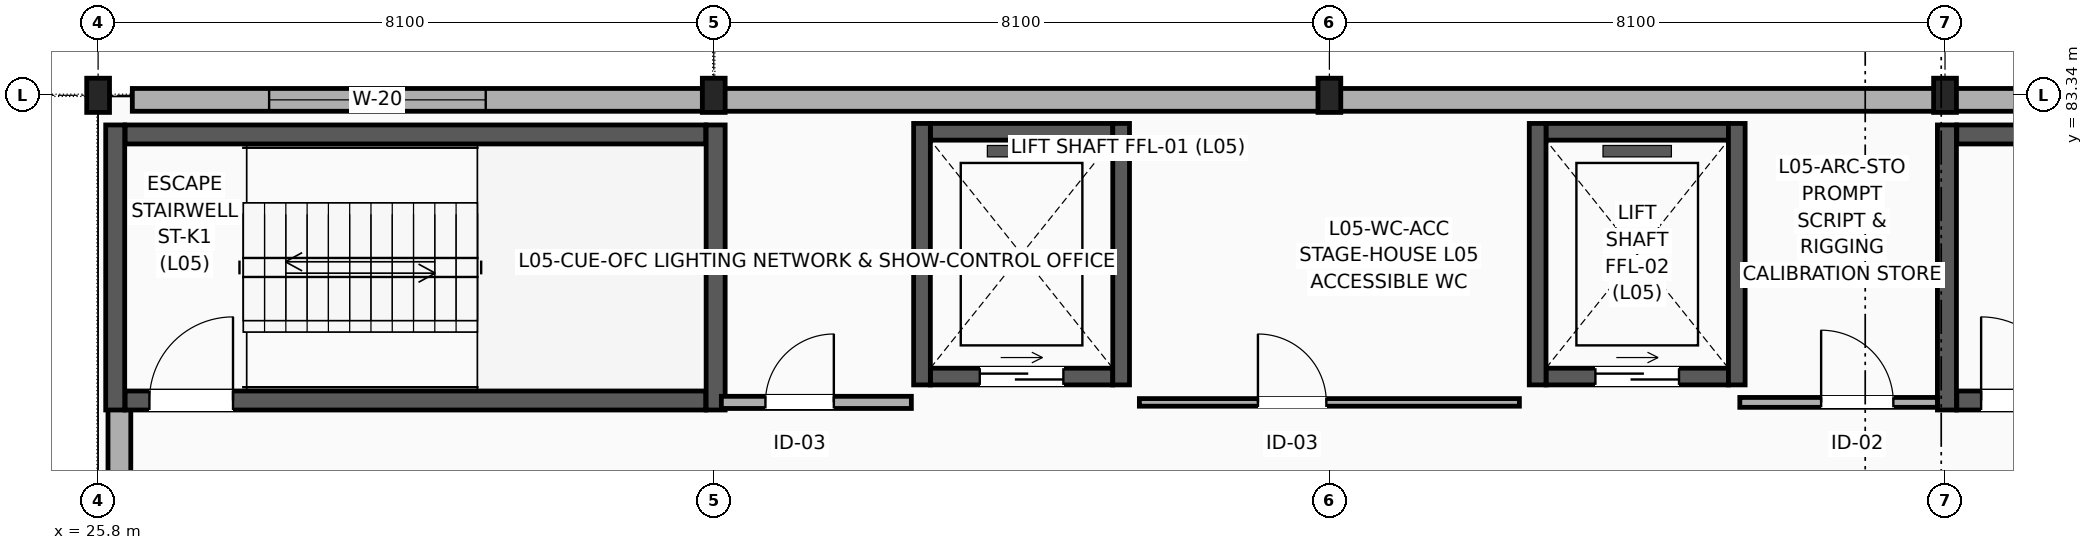
"""IFC4 building model, lengths in metres.
Left out: names, types, materials, properties, quantities, classifications, styles, units other than length and angle.
Written with IfcOpenShell. Run it as: python <this file> out.ifc"""

import sys

from ifc_helpers import new_model, si_unit, direction, frame, frame_2d, origin, origin_2d, place, context, subcontext, project, spatial, rectangle, i_section, extrude, element, fill, save


model = new_model("IFC4")
c1 = context("Model", 3, precision=1e-05, world=origin(), true_north=direction((0.0, 1.0)))
c2 = subcontext(c1, "Body", "Model", "MODEL_VIEW")
j1 = project(units=[si_unit("LENGTHUNIT", "METRE"), si_unit("PLANEANGLEUNIT", "RADIAN")], contexts=[c1])
p1 = place(None, origin())
s1 = spatial("IfcSite", under=j1, at=p1, CompositionType="ELEMENT")
p2 = place(p1, origin())
s2 = spatial("IfcBuilding", under=s1, at=p2, CompositionType="ELEMENT")
p3 = place(p2, frame((0.0, 0.0, 23.4)))
s3 = spatial("IfcBuildingStorey", under=s2, at=p3, CompositionType="ELEMENT", Elevation=23.4)
for number, where, z_axis, x_axis in (
    (1, (25.8, 83.34, 0.0), (0.0, 0.0, 1.0), (1.0, 0.0, 0.0)),
    (2, (33.9, 83.34, 0.0), (0.0, 0.0, 1.0), (1.0, 0.0, 0.0)),
    (3, (42.0, 83.34, 0.0), (0.0, 0.0, 1.0), (1.0, 0.0, 0.0)),
    (4, (50.1, 83.34, 0.0), (0.0, 0.0, 1.0), (1.0, 0.0, 0.0)),
):
    element("IfcColumn", number, at=place(p3, frame(where, z_axis=z_axis, x_axis=x_axis)), inside=s3, PredefinedType="COLUMN", context=c2, shape_type="SweptSolid", body=[
        extrude(i_section(OverallWidth=0.3, OverallDepth=0.45, WebThickness=0.014, FlangeThickness=0.026, FilletRadius=0.027, at=origin_2d()), origin(), (0.0, 0.0, 1.0), 4.2),
    ])
p4 = place(p3, frame((26.08, 61.35, 0.0), z_axis=(0.0, 0.0, 1.0), x_axis=(0.0, 1.0, 0.0)))
e5 = element("IfcWall", 5, at=p4, inside=s3, PredefinedType="SOLIDWALL", context=c2, shape_type="SweptSolid", body=[
    extrude(rectangle(XDim=17.95, YDim=0.3, at=frame_2d((8.975, 0.0))), origin(), (0.0, 0.0, 1.0), 3.36),
])
p5 = place(p3, frame((26.25, 83.28, 0.0), z_axis=(0.0, 0.0, 1.0), x_axis=(1.0, 0.0, 0.0)))
e6 = element("IfcWall", 6, at=p5, inside=s3, PredefinedType="SOLIDWALL", context=c2, shape_type="SweptSolid", body=[
    extrude(rectangle(XDim=31.5, YDim=0.3, at=frame_2d((15.75, 0.0))), origin(), (0.0, 0.0, 1.0), 3.36),
])
p6 = place(p5, frame((1.8, 0.0, 1.5)))
e7 = element("IfcOpeningElement", 7, at=p6, cuts=e6, PredefinedType="OPENING", context=c2, shape_type="SweptSolid", body=[
    extrude(rectangle(XDim=2.85, YDim=1.65, at=frame_2d((1.425, 0.825))), frame((0.0, 0.16, 0.0), z_axis=(0.0, -1.0, 0.0), x_axis=(1.0, 0.0, 0.0)), (0.0, 0.0, 1.0), 0.32),
])
p7 = place(p5, frame((25.6, 0.0, 1.5)))
e8 = element("IfcOpeningElement", 8, at=p7, cuts=e6, PredefinedType="OPENING", context=c2, shape_type="SweptSolid", body=[
    extrude(rectangle(XDim=2.85, YDim=1.65, at=frame_2d((1.425, 0.825))), frame((0.0, 0.16, 0.0), z_axis=(0.0, -1.0, 0.0), x_axis=(1.0, 0.0, 0.0)), (0.0, 0.0, 1.0), 0.32),
])
p8 = place(p3, frame((26.155, 79.325, 0.0), z_axis=(0.0, 0.0, 1.0), x_axis=(1.0, 0.0, 0.0)))
e9 = element("IfcWall", 9, at=p8, inside=s3, PredefinedType="SHEAR", context=c2, shape_type="SweptSolid", body=[
    extrude(rectangle(XDim=7.64, YDim=0.25, at=frame_2d((3.82, 0.0))), origin(), (0.0, 0.0, 1.0), 3.98),
])
p9 = place(p8, frame((0.32, 0.0, 0.0)))
e10 = element("IfcOpeningElement", 10, at=p9, cuts=e9, PredefinedType="OPENING", context=c2, shape_type="SweptSolid", body=[
    extrude(rectangle(XDim=1.1, YDim=2.2, at=frame_2d((0.55, 1.1))), frame((0.0, 0.135, 0.0), z_axis=(0.0, -1.0, 0.0), x_axis=(1.0, 0.0, 0.0)), (0.0, 0.0, 1.0), 0.27),
])
p10 = place(p3, frame((26.155, 82.825, 0.0), z_axis=(0.0, 0.0, 1.0), x_axis=(1.0, 0.0, 0.0)))
e11 = element("IfcWall", 11, at=p10, inside=s3, PredefinedType="SHEAR", context=c2, shape_type="SweptSolid", body=[
    extrude(rectangle(XDim=7.64, YDim=0.25, at=frame_2d((3.82, 0.0))), origin(), (0.0, 0.0, 1.0), 3.98),
])
for number, where, z_axis, x_axis in (
    (12, (26.025, 79.2, 0.0), (0.0, 0.0, 1.0), (0.0, 1.0, 0.0)),
    (13, (33.925, 79.2, 0.0), (0.0, 0.0, 1.0), (0.0, 1.0, 0.0)),
):
    element("IfcWall", number, at=place(p3, frame(where, z_axis=z_axis, x_axis=x_axis)), inside=s3, PredefinedType="SHEAR", context=c2, shape_type="SweptSolid", body=[
        extrude(rectangle(XDim=3.75, YDim=0.25, at=frame_2d((1.875, 0.0))), origin(), (0.0, 0.0, 1.0), 3.98),
    ])
p11 = place(p3, frame((50.255, 79.325, 0.0), z_axis=(0.0, 0.0, 1.0), x_axis=(1.0, 0.0, 0.0)))
e14 = element("IfcWall", 14, at=p11, inside=s3, PredefinedType="SHEAR", context=c2, shape_type="SweptSolid", body=[
    extrude(rectangle(XDim=7.64, YDim=0.25, at=frame_2d((3.82, 0.0))), origin(), (0.0, 0.0, 1.0), 3.98),
])
p12 = place(p11, frame((0.32, 0.0, 0.0)))
e15 = element("IfcOpeningElement", 15, at=p12, cuts=e14, PredefinedType="OPENING", context=c2, shape_type="SweptSolid", body=[
    extrude(rectangle(XDim=1.1, YDim=2.2, at=frame_2d((0.55, 1.1))), frame((0.0, 0.135, 0.0), z_axis=(0.0, -1.0, 0.0), x_axis=(1.0, 0.0, 0.0)), (0.0, 0.0, 1.0), 0.27),
])
p13 = place(p3, frame((50.255, 82.825, 0.0), z_axis=(0.0, 0.0, 1.0), x_axis=(1.0, 0.0, 0.0)))
e16 = element("IfcWall", 16, at=p13, inside=s3, PredefinedType="SHEAR", context=c2, shape_type="SweptSolid", body=[
    extrude(rectangle(XDim=7.64, YDim=0.25, at=frame_2d((3.82, 0.0))), origin(), (0.0, 0.0, 1.0), 3.98),
])
p14 = place(p3, frame((50.125, 79.2, 0.0), z_axis=(0.0, 0.0, 1.0), x_axis=(0.0, 1.0, 0.0)))
e17 = element("IfcWall", 17, at=p14, inside=s3, PredefinedType="SHEAR", context=c2, shape_type="SweptSolid", body=[
    extrude(rectangle(XDim=3.75, YDim=0.25, at=frame_2d((1.875, 0.0))), origin(), (0.0, 0.0, 1.0), 3.98),
])
p15 = place(p3, frame((36.75, 79.64, 0.0), z_axis=(0.0, 0.0, 1.0), x_axis=(1.0, 0.0, 0.0)))
e18 = element("IfcWall", 18, at=p15, inside=s3, PredefinedType="SOLIDWALL", context=c2, shape_type="SweptSolid", body=[
    extrude(rectangle(XDim=2.4, YDim=0.22, at=frame_2d((1.2, 0.0))), origin(), (0.0, 0.0, 1.0), 3.98),
])
p16 = place(p15, frame((0.65, 0.0, 0.0)))
e19 = element("IfcOpeningElement", 19, at=p16, cuts=e18, PredefinedType="OPENING", context=c2, shape_type="SweptSolid", body=[
    extrude(rectangle(XDim=1.1, YDim=2.2, at=frame_2d((0.55, 1.1))), frame((0.0, 0.12, 0.0), z_axis=(0.0, -1.0, 0.0), x_axis=(1.0, 0.0, 0.0)), (0.0, 0.0, 1.0), 0.24),
])
p17 = place(p3, frame((36.75, 82.86, 0.0), z_axis=(0.0, 0.0, 1.0), x_axis=(1.0, 0.0, 0.0)))
e20 = element("IfcWall", 20, at=p17, inside=s3, PredefinedType="SOLIDWALL", context=c2, shape_type="SweptSolid", body=[
    extrude(rectangle(XDim=2.4, YDim=0.22, at=frame_2d((1.2, 0.0))), origin(), (0.0, 0.0, 1.0), 3.98),
])
for number, where, z_axis, x_axis in (
    (21, (36.64, 79.53, 0.0), (0.0, 0.0, 1.0), (0.0, 1.0, 0.0)),
    (22, (39.26, 79.53, 0.0), (0.0, 0.0, 1.0), (0.0, 1.0, 0.0)),
):
    element("IfcWall", number, at=place(p3, frame(where, z_axis=z_axis, x_axis=x_axis)), inside=s3, PredefinedType="SOLIDWALL", context=c2, shape_type="SweptSolid", body=[
        extrude(rectangle(XDim=3.44, YDim=0.22, at=frame_2d((1.72, 0.0))), origin(), (0.0, 0.0, 1.0), 3.98),
    ])
p18 = place(p3, frame((44.85, 79.64, 0.0), z_axis=(0.0, 0.0, 1.0), x_axis=(1.0, 0.0, 0.0)))
e23 = element("IfcWall", 23, at=p18, inside=s3, PredefinedType="SOLIDWALL", context=c2, shape_type="SweptSolid", body=[
    extrude(rectangle(XDim=2.4, YDim=0.22, at=frame_2d((1.2, 0.0))), origin(), (0.0, 0.0, 1.0), 3.98),
])
p19 = place(p18, frame((0.65, 0.0, 0.0)))
e24 = element("IfcOpeningElement", 24, at=p19, cuts=e23, PredefinedType="OPENING", context=c2, shape_type="SweptSolid", body=[
    extrude(rectangle(XDim=1.1, YDim=2.2, at=frame_2d((0.55, 1.1))), frame((0.0, 0.12, 0.0), z_axis=(0.0, -1.0, 0.0), x_axis=(1.0, 0.0, 0.0)), (0.0, 0.0, 1.0), 0.24),
])
p20 = place(p3, frame((44.85, 82.86, 0.0), z_axis=(0.0, 0.0, 1.0), x_axis=(1.0, 0.0, 0.0)))
e25 = element("IfcWall", 25, at=p20, inside=s3, PredefinedType="SOLIDWALL", context=c2, shape_type="SweptSolid", body=[
    extrude(rectangle(XDim=2.4, YDim=0.22, at=frame_2d((1.2, 0.0))), origin(), (0.0, 0.0, 1.0), 3.98),
])
for number, where, z_axis, x_axis in (
    (26, (44.74, 79.53, 0.0), (0.0, 0.0, 1.0), (0.0, 1.0, 0.0)),
    (27, (47.36, 79.53, 0.0), (0.0, 0.0, 1.0), (0.0, 1.0, 0.0)),
):
    element("IfcWall", number, at=place(p3, frame(where, z_axis=z_axis, x_axis=x_axis)), inside=s3, PredefinedType="SOLIDWALL", context=c2, shape_type="SweptSolid", body=[
        extrude(rectangle(XDim=3.44, YDim=0.22, at=frame_2d((1.72, 0.0))), origin(), (0.0, 0.0, 1.0), 3.98),
    ])
p21 = place(p3, frame((34.0, 79.3, 0.0), z_axis=(0.0, 0.0, 1.0), x_axis=(1.0, 0.0, 0.0)))
e28 = element("IfcWall", 28, at=p21, inside=s3, PredefinedType="PARTITIONING", context=c2, shape_type="SweptSolid", body=[
    extrude(rectangle(XDim=2.5, YDim=0.16, at=frame_2d((1.25, 0.0))), origin(), (0.0, 0.0, 1.0), 3.96),
])
p22 = place(p21, frame((0.58, 0.0, 0.0)))
e29 = element("IfcOpeningElement", 29, at=p22, cuts=e28, PredefinedType="OPENING", context=c2, shape_type="SweptSolid", body=[
    extrude(rectangle(XDim=0.9, YDim=2.1, at=frame_2d((0.45, 1.05))), frame((0.0, 0.09, 0.0), z_axis=(0.0, -1.0, 0.0), x_axis=(1.0, 0.0, 0.0)), (0.0, 0.0, 1.0), 0.18),
])
p23 = place(p3, frame((39.5, 79.3, 0.0), z_axis=(0.0, 0.0, 1.0), x_axis=(1.0, 0.0, 0.0)))
e30 = element("IfcWall", 30, at=p23, inside=s3, PredefinedType="PARTITIONING", context=c2, shape_type="SweptSolid", body=[
    extrude(rectangle(XDim=5.0, YDim=0.1, at=frame_2d((2.5, 0.0))), origin(), (0.0, 0.0, 1.0), 3.96),
])
p24 = place(p23, frame((1.56, 0.0, 0.0)))
e31 = element("IfcOpeningElement", 31, at=p24, cuts=e30, PredefinedType="OPENING", context=c2, shape_type="SweptSolid", body=[
    extrude(rectangle(XDim=0.9, YDim=2.1, at=frame_2d((0.45, 1.05))), frame((0.0, 0.06, 0.0), z_axis=(0.0, -1.0, 0.0), x_axis=(1.0, 0.0, 0.0)), (0.0, 0.0, 1.0), 0.12),
])
p25 = place(p3, frame((47.4, 79.3, 0.0), z_axis=(0.0, 0.0, 1.0), x_axis=(1.0, 0.0, 0.0)))
e32 = element("IfcWall", 32, at=p25, inside=s3, PredefinedType="PARTITIONING", context=c2, shape_type="SweptSolid", body=[
    extrude(rectangle(XDim=2.6, YDim=0.13, at=frame_2d((1.3, 0.0))), origin(), (0.0, 0.0, 1.0), 3.96),
])
p26 = place(p25, frame((1.07, 0.0, 0.0)))
e33 = element("IfcOpeningElement", 33, at=p26, cuts=e32, PredefinedType="OPENING", context=c2, shape_type="SweptSolid", body=[
    extrude(rectangle(XDim=0.95, YDim=2.15, at=frame_2d((0.475, 1.075))), frame((0.0, 0.075, 0.0), z_axis=(0.0, -1.0, 0.0), x_axis=(1.0, 0.0, 0.0)), (0.0, 0.0, 1.0), 0.15),
])
p27 = place(p6, origin())
e34 = element("IfcWindow", 34, at=p27, inside=s3, PartitioningType="SINGLE_PANEL", PredefinedType="WINDOW", context=c2, shape_type="SweptSolid", body=[
    extrude(rectangle(XDim=2.85, YDim=1.65, at=frame_2d((1.425, 0.825))), frame((0.0, 0.03, 0.0), z_axis=(0.0, -1.0, 0.0), x_axis=(1.0, 0.0, 0.0)), (0.0, 0.0, 1.0), 0.06),
])
fill(e7, e34)
p28 = place(p9, origin())
e35 = element("IfcDoor", 35, at=p28, inside=s3, OperationType="SINGLE_SWING_RIGHT", PredefinedType="DOOR", context=c2, shape_type="SweptSolid", body=[
    extrude(rectangle(XDim=1.1, YDim=2.2, at=frame_2d((0.55, 1.1))), frame((0.0, 0.025, 0.0), z_axis=(0.0, -1.0, 0.0), x_axis=(1.0, 0.0, 0.0)), (0.0, 0.0, 1.0), 0.05),
])
fill(e10, e35)
p29 = place(p12, origin())
e36 = element("IfcDoor", 36, at=p29, inside=s3, OperationType="SINGLE_SWING_LEFT", PredefinedType="DOOR", context=c2, shape_type="SweptSolid", body=[
    extrude(rectangle(XDim=1.1, YDim=2.2, at=frame_2d((0.55, 1.1))), frame((0.0, 0.025, 0.0), z_axis=(0.0, -1.0, 0.0), x_axis=(1.0, 0.0, 0.0)), (0.0, 0.0, 1.0), 0.05),
])
fill(e15, e36)
p30 = place(p16, origin())
e37 = element("IfcDoor", 37, at=p30, inside=s3, OperationType="SLIDING_TO_LEFT", PredefinedType="DOOR", context=c2, shape_type="SweptSolid", body=[
    extrude(rectangle(XDim=1.1, YDim=2.2, at=frame_2d((0.55, 1.1))), frame((0.0, 0.025, 0.0), z_axis=(0.0, -1.0, 0.0), x_axis=(1.0, 0.0, 0.0)), (0.0, 0.0, 1.0), 0.05),
])
fill(e19, e37)
p31 = place(p19, origin())
e38 = element("IfcDoor", 38, at=p31, inside=s3, OperationType="SLIDING_TO_LEFT", PredefinedType="DOOR", context=c2, shape_type="SweptSolid", body=[
    extrude(rectangle(XDim=1.1, YDim=2.2, at=frame_2d((0.55, 1.1))), frame((0.0, 0.025, 0.0), z_axis=(0.0, -1.0, 0.0), x_axis=(1.0, 0.0, 0.0)), (0.0, 0.0, 1.0), 0.05),
])
fill(e24, e38)
p32 = place(p22, origin())
e39 = element("IfcDoor", 39, at=p32, inside=s3, OperationType="SINGLE_SWING_RIGHT", PredefinedType="DOOR", context=c2, shape_type="SweptSolid", body=[
    extrude(rectangle(XDim=0.9, YDim=2.1, at=frame_2d((0.45, 1.05))), frame((0.0, 0.025, 0.0), z_axis=(0.0, -1.0, 0.0), x_axis=(1.0, 0.0, 0.0)), (0.0, 0.0, 1.0), 0.05),
])
fill(e29, e39)
p33 = place(p24, origin())
e40 = element("IfcDoor", 40, at=p33, inside=s3, OperationType="SINGLE_SWING_LEFT", PredefinedType="DOOR", context=c2, shape_type="SweptSolid", body=[
    extrude(rectangle(XDim=0.9, YDim=2.1, at=frame_2d((0.45, 1.05))), frame((0.0, 0.025, 0.0), z_axis=(0.0, -1.0, 0.0), x_axis=(1.0, 0.0, 0.0)), (0.0, 0.0, 1.0), 0.05),
])
fill(e31, e40)
p34 = place(p26, origin())
e41 = element("IfcDoor", 41, at=p34, inside=s3, OperationType="SINGLE_SWING_LEFT", PredefinedType="DOOR", context=c2, shape_type="SweptSolid", body=[
    extrude(rectangle(XDim=0.95, YDim=2.15, at=frame_2d((0.475, 1.075))), frame((0.0, 0.025, 0.0), z_axis=(0.0, -1.0, 0.0), x_axis=(1.0, 0.0, 0.0)), (0.0, 0.0, 1.0), 0.05),
])
fill(e33, e41)
save(model, sys.argv[1])
